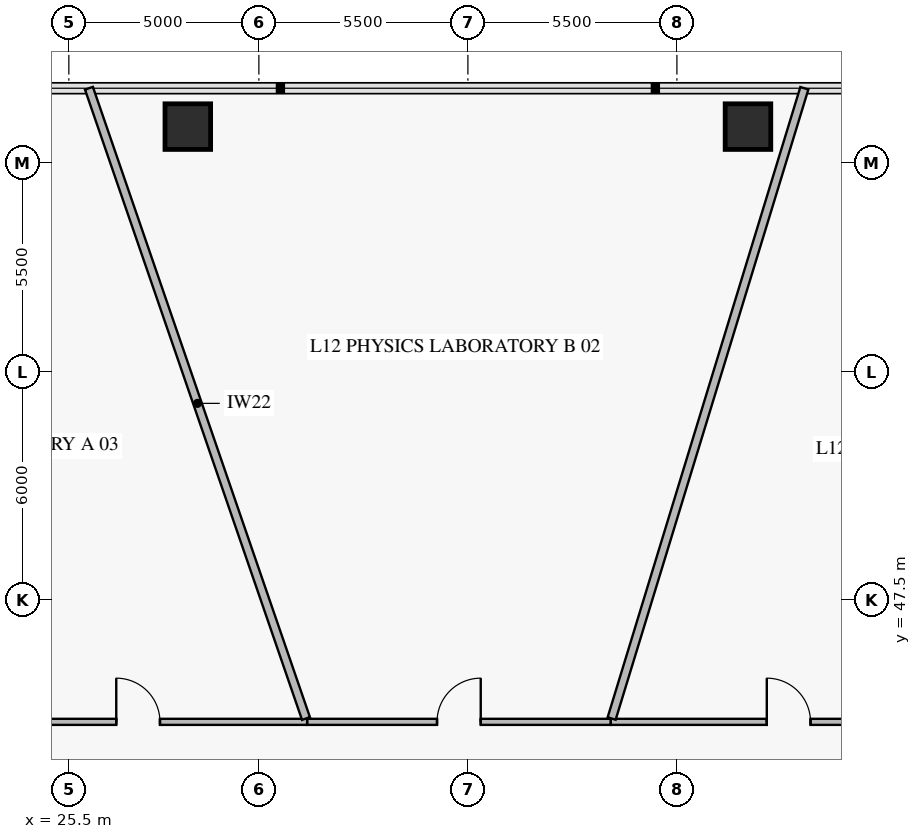
"""IFC4 building model, lengths in metres.
Left out: names, types, materials, properties, quantities, classifications, styles, units other than length and angle.
Written with IfcOpenShell. Run it as: python <this file> out.ifc"""

import sys

from ifc_helpers import new_model, si_unit, direction, frame, frame_2d, origin, origin_2d, place, context, subcontext, project, spatial, rectangle, extrude, element, fill, save


model = new_model("IFC4")
c1 = context("Model", 3, precision=1e-05, world=origin(), true_north=direction((0.0, 1.0)))
c2 = subcontext(c1, "Body", "Model", "MODEL_VIEW")
j1 = project(units=[si_unit("LENGTHUNIT", "METRE"), si_unit("PLANEANGLEUNIT", "RADIAN")], contexts=[c1])
p1 = place(None, origin())
s1 = spatial("IfcSite", under=j1, at=p1, CompositionType="ELEMENT")
p2 = place(p1, origin())
s2 = spatial("IfcBuilding", under=s1, at=p2, CompositionType="ELEMENT")
p3 = place(p2, frame((0.0, 0.0, 49.8)))
s3 = spatial("IfcBuildingStorey", under=s2, at=p3, CompositionType="ELEMENT", Elevation=49.8)
for number, where, z_axis, x_axis in (
    (1, (43.37, 59.948, 0.0), (0.0, 0.0, 1.0), (-1.0, 0.0, 0.0)),
    (2, (28.63, 59.948, 0.0), (0.0, 0.0, 1.0), (-1.0, 0.0, 0.0)),
):
    element("IfcColumn", number, at=place(p3, frame(where, z_axis=z_axis, x_axis=x_axis)), inside=s3, PredefinedType="COLUMN", context=c2, shape_type="SweptSolid", body=[
        extrude(rectangle(XDim=1.2, YDim=1.2, at=origin_2d()), origin(), (0.0, 0.0, 1.0), 3.92),
    ])
p4 = place(p3, frame((49.125, 44.285, 0.0), z_axis=(0.0, 0.0, 1.0), x_axis=(-1.0, 0.0, 0.0)))
e3 = element("IfcWall", 3, at=p4, inside=s3, PredefinedType="PARTITIONING", context=c2, shape_type="SweptSolid", body=[
    extrude(rectangle(XDim=9.369, YDim=0.16, at=frame_2d((4.685, 0.0))), origin(), (0.0, 0.0, 1.0), 3.22),
])
p5 = place(p4, frame((4.11, 0.0, 0.0)))
e4 = element("IfcOpeningElement", 4, at=p5, cuts=e3, PredefinedType="OPENING", context=c2, shape_type="SweptSolid", body=[
    extrude(rectangle(XDim=1.15, YDim=2.2, at=frame_2d((0.575, 1.1))), frame((0.0, 0.092, 0.0), z_axis=(0.0, -1.0, 0.0), x_axis=(1.0, 0.0, 0.0)), (0.0, 0.0, 1.0), 0.184),
])
p6 = place(p3, frame((39.756, 44.285, 0.0), z_axis=(0.0, 0.0, 1.0), x_axis=(-1.0, 0.0, 0.0)))
e5 = element("IfcWall", 5, at=p6, inside=s3, PredefinedType="PARTITIONING", context=c2, shape_type="SweptSolid", body=[
    extrude(rectangle(XDim=7.986, YDim=0.16, at=frame_2d((3.993, 0.0))), origin(), (0.0, 0.0, 1.0), 3.22),
])
p7 = place(p6, frame((3.418, 0.0, 0.0)))
e6 = element("IfcOpeningElement", 6, at=p7, cuts=e5, PredefinedType="OPENING", context=c2, shape_type="SweptSolid", body=[
    extrude(rectangle(XDim=1.15, YDim=2.2, at=frame_2d((0.575, 1.1))), frame((0.0, 0.092, 0.0), z_axis=(0.0, -1.0, 0.0), x_axis=(1.0, 0.0, 0.0)), (0.0, 0.0, 1.0), 0.184),
])
p8 = place(p3, frame((31.77, 44.285, 0.0), z_axis=(0.0, 0.0, 1.0), x_axis=(-1.0, 0.0, 0.0)))
e7 = element("IfcWall", 7, at=p8, inside=s3, PredefinedType="PARTITIONING", context=c2, shape_type="SweptSolid", body=[
    extrude(rectangle(XDim=8.895, YDim=0.16, at=frame_2d((4.448, 0.0))), origin(), (0.0, 0.0, 1.0), 3.22),
])
p9 = place(p8, frame((3.872, 0.0, 0.0)))
e8 = element("IfcOpeningElement", 8, at=p9, cuts=e7, PredefinedType="OPENING", context=c2, shape_type="SweptSolid", body=[
    extrude(rectangle(XDim=1.15, YDim=2.2, at=frame_2d((0.575, 1.1))), frame((0.0, 0.092, 0.0), z_axis=(0.0, -1.0, 0.0), x_axis=(1.0, 0.0, 0.0)), (0.0, 0.0, 1.0), 0.184),
])
p10 = place(p3, frame((39.783, 44.373, 0.0), z_axis=(0.0, 0.0, 1.0), x_axis=(0.29237803707, 0.956302819947, 0.0)))
e9 = element("IfcWall", 9, at=p10, inside=s3, PredefinedType="PARTITIONING", context=c2, shape_type="SweptSolid", body=[
    extrude(rectangle(XDim=17.343, YDim=0.22, at=frame_2d((8.672, 0.0))), origin(), (0.0, 0.0, 1.0), 3.17),
])
p11 = place(p3, frame((31.74, 44.373, 0.0), z_axis=(0.0, 0.0, 1.0), x_axis=(-0.325561284918, 0.945520940943, 0.0)))
e10 = element("IfcWall", 10, at=p11, inside=s3, PredefinedType="PARTITIONING", context=c2, shape_type="SweptSolid", body=[
    extrude(rectangle(XDim=17.541, YDim=0.22, at=frame_2d((8.771, 0.0))), origin(), (0.0, 0.0, 1.0), 3.17),
])
p12 = place(p5, frame((1.15, 0.0, 0.0), z_axis=(0.0, 0.0, 1.0), x_axis=(-1.0, 0.0, 0.0)))
e11 = element("IfcDoor", 11, at=p12, inside=s3, OperationType="SINGLE_SWING_LEFT", PredefinedType="DOOR", context=c2, shape_type="SweptSolid", body=[
    extrude(rectangle(XDim=1.15, YDim=2.2, at=frame_2d((0.575, 1.1))), frame((0.0, 0.025, 0.0), z_axis=(0.0, -1.0, 0.0), x_axis=(1.0, 0.0, 0.0)), (0.0, 0.0, 1.0), 0.05),
])
fill(e4, e11)
p13 = place(p7, frame((1.15, 0.0, 0.0), z_axis=(0.0, 0.0, 1.0), x_axis=(-1.0, 0.0, 0.0)))
e12 = element("IfcDoor", 12, at=p13, inside=s3, OperationType="SINGLE_SWING_RIGHT", PredefinedType="DOOR", context=c2, shape_type="SweptSolid", body=[
    extrude(rectangle(XDim=1.15, YDim=2.2, at=frame_2d((0.575, 1.1))), frame((0.0, 0.025, 0.0), z_axis=(0.0, -1.0, 0.0), x_axis=(1.0, 0.0, 0.0)), (0.0, 0.0, 1.0), 0.05),
])
fill(e6, e12)
p14 = place(p9, frame((1.15, 0.0, 0.0), z_axis=(0.0, 0.0, 1.0), x_axis=(-1.0, 0.0, 0.0)))
e13 = element("IfcDoor", 13, at=p14, inside=s3, OperationType="SINGLE_SWING_LEFT", PredefinedType="DOOR", context=c2, shape_type="SweptSolid", body=[
    extrude(rectangle(XDim=1.15, YDim=2.2, at=frame_2d((0.575, 1.1))), frame((0.0, 0.025, 0.0), z_axis=(0.0, -1.0, 0.0), x_axis=(1.0, 0.0, 0.0)), (0.0, 0.0, 1.0), 0.05),
])
fill(e8, e13)
save(model, sys.argv[1])
